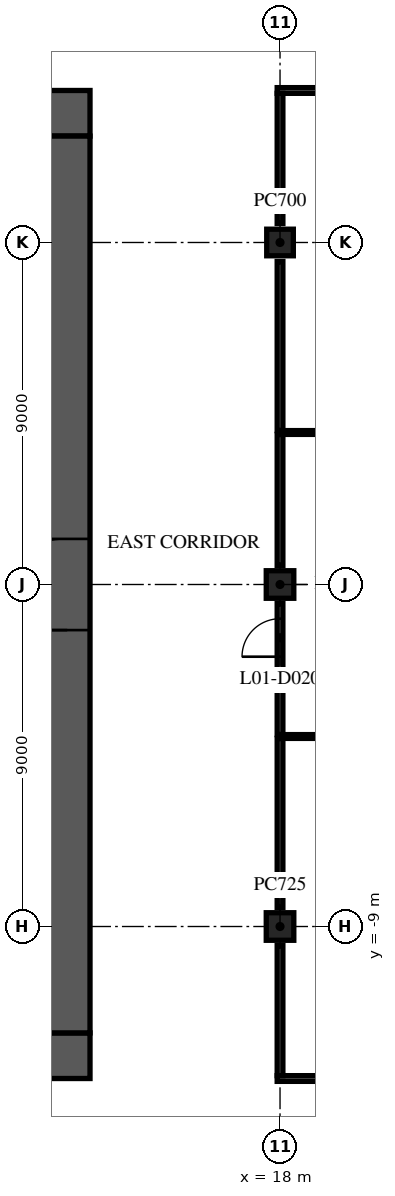
"""IFC4 building model, lengths in metres.
Left out: names, types, materials, properties, quantities, classifications, styles, units other than length and angle.
Written with IfcOpenShell. Run it as: python <this file> out.ifc"""

import sys

from ifc_helpers import new_model, si_unit, direction, frame, frame_2d, origin, origin_2d, place, context, subcontext, project, spatial, rectangle, extrude, element, fill, save


model = new_model("IFC4")
c1 = context("Model", 3, precision=1e-05, world=origin(), true_north=direction((0.0, 1.0)))
c2 = subcontext(c1, "Body", "Model", "MODEL_VIEW")
j1 = project(units=[si_unit("LENGTHUNIT", "METRE"), si_unit("PLANEANGLEUNIT", "RADIAN")], contexts=[c1])
p1 = place(None, origin())
s1 = spatial("IfcSite", under=j1, at=p1, CompositionType="ELEMENT")
p2 = place(p1, origin())
s2 = spatial("IfcBuilding", under=s1, at=p2, CompositionType="ELEMENT")
p3 = place(p2, frame((0.0, 0.0, 4.5)))
s3 = spatial("IfcBuildingStorey", under=s2, at=p3, CompositionType="ELEMENT", Elevation=4.5)
for number, where, z_axis, x_axis in (
    (1, (18.0, -9.0, 0.0), (0.0, 0.0, 1.0), (1.0, 0.0, 0.0)),
    (2, (18.0, 0.0, 0.0), (0.0, 0.0, 1.0), (1.0, 0.0, 0.0)),
):
    element("IfcColumn", number, at=place(p3, frame(where, z_axis=z_axis, x_axis=x_axis)), inside=s3, PredefinedType="COLUMN", context=c2, shape_type="SweptSolid", body=[
        extrude(rectangle(XDim=0.725, YDim=0.725, at=origin_2d()), origin(), (0.0, 0.0, 1.0), 4.5),
    ])
p4 = place(p3, frame((18.0, 9.0, 0.0), z_axis=(0.0, 0.0, 1.0), x_axis=(1.0, 0.0, 0.0)))
e3 = element("IfcColumn", 3, at=p4, inside=s3, PredefinedType="COLUMN", context=c2, shape_type="SweptSolid", body=[
    extrude(rectangle(XDim=0.7, YDim=0.7, at=origin_2d()), origin(), (0.0, 0.0, 1.0), 4.5),
])
p5 = place(p3, frame((-13.0, 12.4, 0.0), z_axis=(0.0, 0.0, 1.0), x_axis=(1.0, 0.0, 0.0)))
e4 = element("IfcWall", 4, at=p5, inside=s3, PredefinedType="SHEAR", context=c2, shape_type="SweptSolid", body=[
    extrude(rectangle(XDim=26.0, YDim=1.2, at=frame_2d((13.0, 0.0))), origin(), (0.0, 0.0, 1.0), 4.1),
])
p6 = place(p5, frame((11.8, 0.0, 0.0)))
e5 = element("IfcOpeningElement", 5, at=p6, cuts=e4, PredefinedType="OPENING", context=c2, shape_type="SweptSolid", body=[
    extrude(rectangle(XDim=2.4, YDim=2.4, at=frame_2d((1.2, 1.2))), frame((0.0, 0.61, 0.0), z_axis=(0.0, -1.0, 0.0), x_axis=(1.0, 0.0, 0.0)), (0.0, 0.0, 1.0), 1.22),
])
p7 = place(p5, frame((22.625, 0.0, 0.0)))
e6 = element("IfcOpeningElement", 6, at=p7, cuts=e4, PredefinedType="OPENING", context=c2, shape_type="SweptSolid", body=[
    extrude(rectangle(XDim=1.2, YDim=2.1, at=frame_2d((0.6, 1.05))), frame((0.0, 0.61, 0.0), z_axis=(0.0, -1.0, 0.0), x_axis=(1.0, 0.0, 0.0)), (0.0, 0.0, 1.0), 1.22),
])
p8 = place(p5, frame((1.6, 0.0, 0.0)))
e7 = element("IfcOpeningElement", 7, at=p8, cuts=e4, PredefinedType="OPENING", context=c2, shape_type="SweptSolid", body=[
    extrude(rectangle(XDim=1.0, YDim=2.1, at=frame_2d((0.5, 1.05))), frame((0.0, 0.61, 0.0), z_axis=(0.0, -1.0, 0.0), x_axis=(1.0, 0.0, 0.0)), (0.0, 0.0, 1.0), 1.22),
])
p9 = place(p3, frame((-13.0, -12.4, 0.0), z_axis=(0.0, 0.0, 1.0), x_axis=(1.0, 0.0, 0.0)))
e8 = element("IfcWall", 8, at=p9, inside=s3, PredefinedType="SHEAR", context=c2, shape_type="SweptSolid", body=[
    extrude(rectangle(XDim=26.0, YDim=1.2, at=frame_2d((13.0, 0.0))), origin(), (0.0, 0.0, 1.0), 4.1),
])
p10 = place(p9, frame((7.9, 0.0, 0.0)))
e9 = element("IfcOpeningElement", 9, at=p10, cuts=e8, PredefinedType="OPENING", context=c2, shape_type="SweptSolid", body=[
    extrude(rectangle(XDim=2.0, YDim=2.1, at=frame_2d((1.0, 1.05))), frame((0.0, 0.61, 0.0), z_axis=(0.0, -1.0, 0.0), x_axis=(1.0, 0.0, 0.0)), (0.0, 0.0, 1.0), 1.22),
])
p11 = place(p9, frame((18.025, 0.0, 0.0)))
e10 = element("IfcOpeningElement", 10, at=p11, cuts=e8, PredefinedType="OPENING", context=c2, shape_type="SweptSolid", body=[
    extrude(rectangle(XDim=1.2, YDim=2.1, at=frame_2d((0.6, 1.05))), frame((0.0, 0.61, 0.0), z_axis=(0.0, -1.0, 0.0), x_axis=(1.0, 0.0, 0.0)), (0.0, 0.0, 1.0), 1.22),
])
p12 = place(p9, frame((2.175, 0.0, 0.0)))
e11 = element("IfcOpeningElement", 11, at=p12, cuts=e8, PredefinedType="OPENING", context=c2, shape_type="SweptSolid", body=[
    extrude(rectangle(XDim=1.2, YDim=2.1, at=frame_2d((0.6, 1.05))), frame((0.0, 0.61, 0.0), z_axis=(0.0, -1.0, 0.0), x_axis=(1.0, 0.0, 0.0)), (0.0, 0.0, 1.0), 1.22),
])
p13 = place(p9, frame((22.625, 0.0, 0.0)))
e12 = element("IfcOpeningElement", 12, at=p13, cuts=e8, PredefinedType="OPENING", context=c2, shape_type="SweptSolid", body=[
    extrude(rectangle(XDim=1.2, YDim=2.1, at=frame_2d((0.6, 1.05))), frame((0.0, 0.61, 0.0), z_axis=(0.0, -1.0, 0.0), x_axis=(1.0, 0.0, 0.0)), (0.0, 0.0, 1.0), 1.22),
])
p14 = place(p3, frame((12.4, -11.8, 0.0), z_axis=(0.0, 0.0, 1.0), x_axis=(0.0, 1.0, 0.0)))
e13 = element("IfcWall", 13, at=p14, inside=s3, PredefinedType="SHEAR", context=c2, shape_type="SweptSolid", body=[
    extrude(rectangle(XDim=23.6, YDim=1.2, at=frame_2d((11.8, 0.0))), origin(), (0.0, 0.0, 1.0), 4.1),
])
p15 = place(p14, frame((10.6, 0.0, 0.0)))
e14 = element("IfcOpeningElement", 14, at=p15, cuts=e13, PredefinedType="OPENING", context=c2, shape_type="SweptSolid", body=[
    extrude(rectangle(XDim=2.4, YDim=2.4, at=frame_2d((1.2, 1.2))), frame((0.0, 0.61, 0.0), z_axis=(0.0, -1.0, 0.0), x_axis=(1.0, 0.0, 0.0)), (0.0, 0.0, 1.0), 1.22),
])
p16 = place(p3, frame((17.925, -13.0, 0.0), z_axis=(0.0, 0.0, 1.0), x_axis=(1.0, 0.0, 0.0)))
e15 = element("IfcWall", 15, at=p16, inside=s3, PredefinedType="PARTITIONING", context=c2, shape_type="SweptSolid", body=[
    extrude(rectangle(XDim=18.075, YDim=0.15, at=frame_2d((9.038, 0.0))), origin(), (0.0, 0.0, 1.0), 4.1),
])
p17 = place(p16, frame((13.075, 0.0, 0.0)))
e16 = element("IfcOpeningElement", 16, at=p17, cuts=e15, PredefinedType="OPENING", context=c2, shape_type="SweptSolid", body=[
    extrude(rectangle(XDim=1.0, YDim=2.1, at=frame_2d((0.5, 1.05))), frame((0.0, 0.085, 0.0), z_axis=(0.0, -1.0, 0.0), x_axis=(1.0, 0.0, 0.0)), (0.0, 0.0, 1.0), 0.17),
])
p18 = place(p3, frame((18.075, -4.0, 0.0), z_axis=(0.0, 0.0, 1.0), x_axis=(1.0, 0.0, 0.0)))
e17 = element("IfcWall", 17, at=p18, inside=s3, PredefinedType="PARTITIONING", context=c2, shape_type="SweptSolid", body=[
    extrude(rectangle(XDim=8.85, YDim=0.1, at=frame_2d((4.425, 0.0))), origin(), (0.0, 0.0, 1.0), 4.1),
])
p19 = place(p3, frame((18.075, 4.0, 0.0), z_axis=(0.0, 0.0, 1.0), x_axis=(1.0, 0.0, 0.0)))
e18 = element("IfcWall", 18, at=p19, inside=s3, PredefinedType="PARTITIONING", context=c2, shape_type="SweptSolid", body=[
    extrude(rectangle(XDim=8.447, YDim=0.1, at=frame_2d((4.223, 0.0))), origin(), (0.0, 0.0, 1.0), 4.1),
])
p20 = place(p3, frame((17.925, 13.0, 0.0), z_axis=(0.0, 0.0, 1.0), x_axis=(1.0, 0.0, 0.0)))
e19 = element("IfcWall", 19, at=p20, inside=s3, PredefinedType="PARTITIONING", context=c2, shape_type="SweptSolid", body=[
    extrude(rectangle(XDim=10.15, YDim=0.15, at=frame_2d((5.075, 0.0))), origin(), (0.0, 0.0, 1.0), 4.1),
])
p21 = place(p20, frame((4.575, 0.0, 0.0)))
e20 = element("IfcOpeningElement", 20, at=p21, cuts=e19, PredefinedType="OPENING", context=c2, shape_type="SweptSolid", body=[
    extrude(rectangle(XDim=1.0, YDim=2.1, at=frame_2d((0.5, 1.05))), frame((0.0, 0.085, 0.0), z_axis=(0.0, -1.0, 0.0), x_axis=(1.0, 0.0, 0.0)), (0.0, 0.0, 1.0), 0.17),
])
p22 = place(p3, frame((18.0, -12.925, 0.0), z_axis=(0.0, 0.0, 1.0), x_axis=(0.0, 1.0, 0.0)))
e21 = element("IfcWall", 21, at=p22, inside=s3, PredefinedType="PARTITIONING", context=c2, shape_type="SweptSolid", body=[
    extrude(rectangle(XDim=3.425, YDim=0.15, at=frame_2d((1.712, 0.0))), origin(), (0.0, 0.0, 1.0), 4.1),
])
p23 = place(p3, frame((18.0, -8.5, 0.0), z_axis=(0.0, 0.0, 1.0), x_axis=(0.0, 1.0, 0.0)))
e22 = element("IfcWall", 22, at=p23, inside=s3, PredefinedType="PARTITIONING", context=c2, shape_type="SweptSolid", body=[
    extrude(rectangle(XDim=4.45, YDim=0.15, at=frame_2d((2.225, 0.0))), origin(), (0.0, 0.0, 1.0), 4.1),
])
p24 = place(p3, frame((18.0, -3.95, 0.0), z_axis=(0.0, 0.0, 1.0), x_axis=(0.0, 1.0, 0.0)))
e23 = element("IfcWall", 23, at=p24, inside=s3, PredefinedType="PARTITIONING", context=c2, shape_type="SweptSolid", body=[
    extrude(rectangle(XDim=3.45, YDim=0.15, at=frame_2d((1.725, 0.0))), origin(), (0.0, 0.0, 1.0), 4.1),
])
p25 = place(p24, frame((2.05, 0.0, 0.0)))
e24 = element("IfcOpeningElement", 24, at=p25, cuts=e23, PredefinedType="OPENING", context=c2, shape_type="SweptSolid", body=[
    extrude(rectangle(XDim=1.0, YDim=2.1, at=frame_2d((0.5, 1.05))), frame((0.0, 0.085, 0.0), z_axis=(0.0, -1.0, 0.0), x_axis=(1.0, 0.0, 0.0)), (0.0, 0.0, 1.0), 0.17),
])
p26 = place(p3, frame((18.0, 0.5, 0.0), z_axis=(0.0, 0.0, 1.0), x_axis=(0.0, 1.0, 0.0)))
e25 = element("IfcWall", 25, at=p26, inside=s3, PredefinedType="PARTITIONING", context=c2, shape_type="SweptSolid", body=[
    extrude(rectangle(XDim=3.45, YDim=0.15, at=frame_2d((1.725, 0.0))), origin(), (0.0, 0.0, 1.0), 4.1),
])
p27 = place(p3, frame((18.0, 4.05, 0.0), z_axis=(0.0, 0.0, 1.0), x_axis=(0.0, 1.0, 0.0)))
e26 = element("IfcWall", 26, at=p27, inside=s3, PredefinedType="PARTITIONING", context=c2, shape_type="SweptSolid", body=[
    extrude(rectangle(XDim=4.45, YDim=0.15, at=frame_2d((2.225, 0.0))), origin(), (0.0, 0.0, 1.0), 4.1),
])
p28 = place(p3, frame((18.0, 9.5, 0.0), z_axis=(0.0, 0.0, 1.0), x_axis=(0.0, 1.0, 0.0)))
e27 = element("IfcWall", 27, at=p28, inside=s3, PredefinedType="PARTITIONING", context=c2, shape_type="SweptSolid", body=[
    extrude(rectangle(XDim=3.425, YDim=0.15, at=frame_2d((1.712, 0.0))), origin(), (0.0, 0.0, 1.0), 4.1),
])
p29 = place(p15, origin())
e28 = element("IfcDoor", 28, at=p29, inside=s3, OperationType="SINGLE_SWING_LEFT", PredefinedType="DOOR", context=c2, shape_type="SweptSolid", body=[
    extrude(rectangle(XDim=2.4, YDim=2.4, at=frame_2d((1.2, 1.2))), frame((0.0, 0.025, 0.0), z_axis=(0.0, -1.0, 0.0), x_axis=(1.0, 0.0, 0.0)), (0.0, 0.0, 1.0), 0.05),
])
fill(e14, e28)
p30 = place(p25, origin())
e29 = element("IfcDoor", 29, at=p30, inside=s3, OperationType="SINGLE_SWING_RIGHT", PredefinedType="DOOR", context=c2, shape_type="SweptSolid", body=[
    extrude(rectangle(XDim=1.0, YDim=2.1, at=frame_2d((0.5, 1.05))), frame((0.0, 0.025, 0.0), z_axis=(0.0, -1.0, 0.0), x_axis=(1.0, 0.0, 0.0)), (0.0, 0.0, 1.0), 0.05),
])
fill(e24, e29)
save(model, sys.argv[1])
